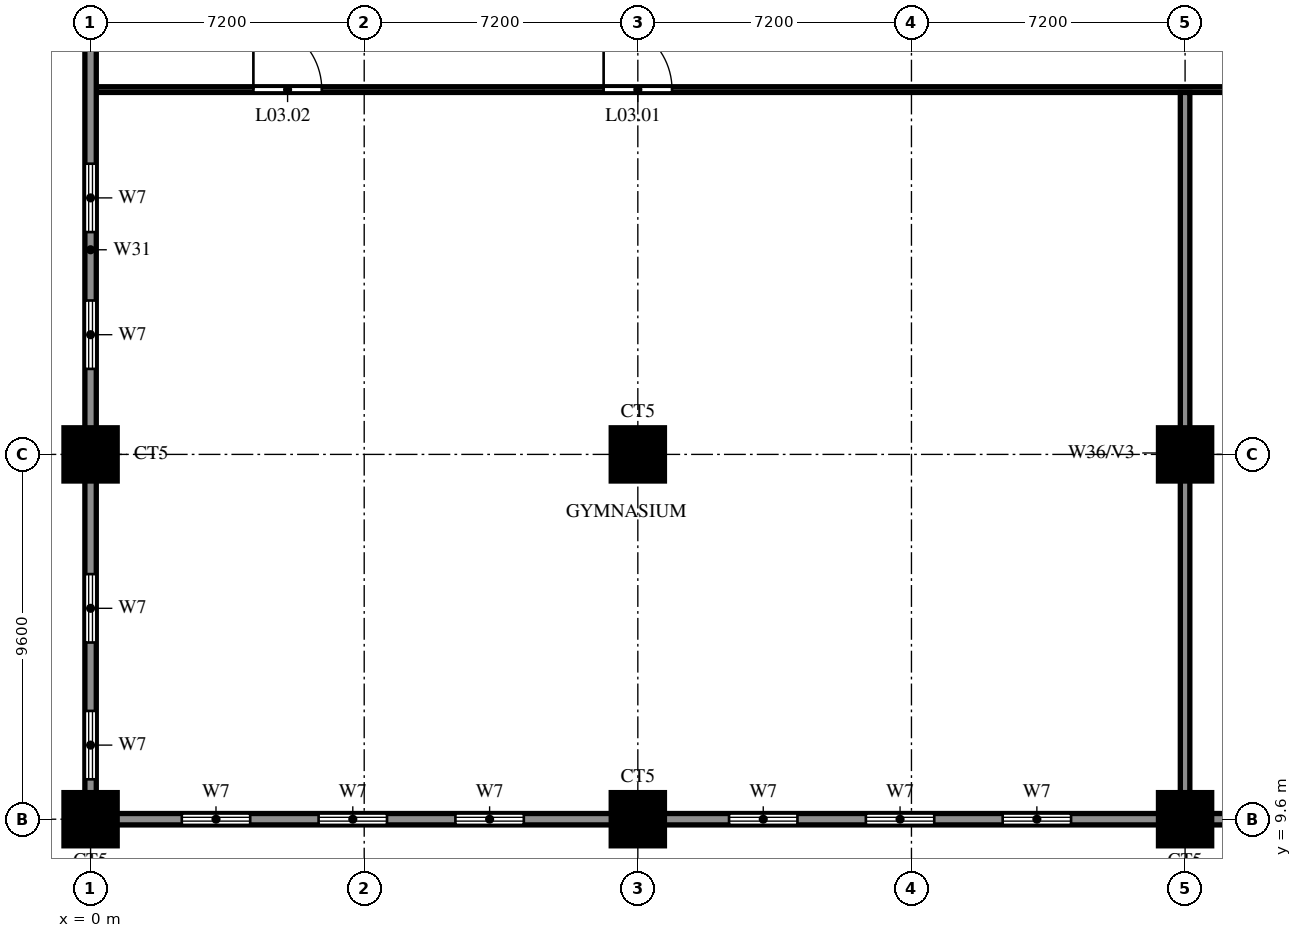
"""IFC4 building model, lengths in metres.
Left out: names, types, materials, properties, quantities, classifications, styles, units other than length and angle.
Written with IfcOpenShell. Run it as: python <this file> out.ifc"""

import sys

from ifc_helpers import new_model, si_unit, direction, frame, frame_2d, origin, origin_2d, place, context, subcontext, project, spatial, rectangle, circle, extrude, source, transform, mapped, element, fill, save


model = new_model("IFC4")
c1 = context("Model", 3, precision=1e-05, world=origin(), true_north=direction((0.0, 1.0)))
c2 = subcontext(c1, "Body", "Model", "MODEL_VIEW")
j1 = project(units=[si_unit("LENGTHUNIT", "METRE"), si_unit("PLANEANGLEUNIT", "RADIAN")], contexts=[c1])
p1 = place(None, origin())
s1 = spatial("IfcSite", under=j1, at=p1, CompositionType="ELEMENT")
p2 = place(p1, origin())
s2 = spatial("IfcBuilding", under=s1, at=p2, CompositionType="ELEMENT")
p3 = place(p2, frame((0.0, 0.0, 17.4)))
s3 = spatial("IfcBuildingStorey", under=s2, at=p3, CompositionType="ELEMENT", Elevation=17.4)
m1 = source(origin(), c2, "Body", "SweptSolid", [
    extrude(circle(Radius=0.7, at=origin_2d()), origin(), (0.0, 0.0, 1.0), 3.8),
])
for number, where, z_axis, x_axis in (
    (1, (0.0, 9.6, 0.0), (0.0, 0.0, 1.0), (1.0, 0.0, 0.0)),
    (2, (14.4, 9.6, 0.0), (0.0, 0.0, 1.0), (1.0, 0.0, 0.0)),
    (3, (28.8, 9.6, 0.0), (0.0, 0.0, 1.0), (1.0, 0.0, 0.0)),
    (4, (0.0, 19.2, 0.0), (0.0, 0.0, 1.0), (1.0, 0.0, 0.0)),
    (5, (14.4, 19.2, 0.0), (0.0, 0.0, 1.0), (1.0, 0.0, 0.0)),
    (6, (28.8, 19.2, 0.0), (0.0, 0.0, 1.0), (1.0, 0.0, 0.0)),
):
    element("IfcColumn", number, at=place(p3, frame(where, z_axis=z_axis, x_axis=x_axis)), inside=s3, PredefinedType="COLUMN", context=c2, shape_type="MappedRepresentation", body=[
        mapped(m1, transform((0.0, 0.0, 0.0))),
    ])
p4 = place(p3, frame((0.0, 9.6, 0.0), z_axis=(0.0, 0.0, 1.0), x_axis=(1.0, 0.0, 0.0)))
e7 = element("IfcWall", 7, at=p4, inside=s3, PredefinedType="SOLIDWALL", context=c2, shape_type="SweptSolid", body=[
    extrude(rectangle(XDim=100.8, YDim=0.3, at=frame_2d((50.4, 0.0))), origin(), (0.0, 0.0, 1.0), 3.8),
])
p5 = place(p4, frame((2.4, 0.0, 0.6)))
e8 = element("IfcOpeningElement", 8, at=p5, cuts=e7, PredefinedType="OPENING", context=c2, shape_type="SweptSolid", body=[
    extrude(rectangle(XDim=1.8, YDim=2.4, at=frame_2d((0.9, 1.2))), frame((0.0, 0.16, 0.0), z_axis=(0.0, -1.0, 0.0), x_axis=(1.0, 0.0, 0.0)), (0.0, 0.0, 1.0), 0.32),
])
p6 = place(p4, frame((6.0, 0.0, 0.6)))
e9 = element("IfcOpeningElement", 9, at=p6, cuts=e7, PredefinedType="OPENING", context=c2, shape_type="SweptSolid", body=[
    extrude(rectangle(XDim=1.8, YDim=2.4, at=frame_2d((0.9, 1.2))), frame((0.0, 0.16, 0.0), z_axis=(0.0, -1.0, 0.0), x_axis=(1.0, 0.0, 0.0)), (0.0, 0.0, 1.0), 0.32),
])
p7 = place(p4, frame((9.6, 0.0, 0.6)))
e10 = element("IfcOpeningElement", 10, at=p7, cuts=e7, PredefinedType="OPENING", context=c2, shape_type="SweptSolid", body=[
    extrude(rectangle(XDim=1.8, YDim=2.4, at=frame_2d((0.9, 1.2))), frame((0.0, 0.16, 0.0), z_axis=(0.0, -1.0, 0.0), x_axis=(1.0, 0.0, 0.0)), (0.0, 0.0, 1.0), 0.32),
])
p8 = place(p4, frame((16.8, 0.0, 0.6)))
e11 = element("IfcOpeningElement", 11, at=p8, cuts=e7, PredefinedType="OPENING", context=c2, shape_type="SweptSolid", body=[
    extrude(rectangle(XDim=1.8, YDim=2.4, at=frame_2d((0.9, 1.2))), frame((0.0, 0.16, 0.0), z_axis=(0.0, -1.0, 0.0), x_axis=(1.0, 0.0, 0.0)), (0.0, 0.0, 1.0), 0.32),
])
p9 = place(p4, frame((20.4, 0.0, 0.6)))
e12 = element("IfcOpeningElement", 12, at=p9, cuts=e7, PredefinedType="OPENING", context=c2, shape_type="SweptSolid", body=[
    extrude(rectangle(XDim=1.8, YDim=2.4, at=frame_2d((0.9, 1.2))), frame((0.0, 0.16, 0.0), z_axis=(0.0, -1.0, 0.0), x_axis=(1.0, 0.0, 0.0)), (0.0, 0.0, 1.0), 0.32),
])
p10 = place(p4, frame((24.0, 0.0, 0.6)))
e13 = element("IfcOpeningElement", 13, at=p10, cuts=e7, PredefinedType="OPENING", context=c2, shape_type="SweptSolid", body=[
    extrude(rectangle(XDim=1.8, YDim=2.4, at=frame_2d((0.9, 1.2))), frame((0.0, 0.16, 0.0), z_axis=(0.0, -1.0, 0.0), x_axis=(1.0, 0.0, 0.0)), (0.0, 0.0, 1.0), 0.32),
])
p11 = place(p4, frame((31.2, 0.0, 0.6)))
e14 = element("IfcOpeningElement", 14, at=p11, cuts=e7, PredefinedType="OPENING", context=c2, shape_type="SweptSolid", body=[
    extrude(rectangle(XDim=1.8, YDim=2.4, at=frame_2d((0.9, 1.2))), frame((0.0, 0.16, 0.0), z_axis=(0.0, -1.0, 0.0), x_axis=(1.0, 0.0, 0.0)), (0.0, 0.0, 1.0), 0.32),
])
p12 = place(p4, frame((34.8, 0.0, 0.6)))
e15 = element("IfcOpeningElement", 15, at=p12, cuts=e7, PredefinedType="OPENING", context=c2, shape_type="SweptSolid", body=[
    extrude(rectangle(XDim=1.8, YDim=2.4, at=frame_2d((0.9, 1.2))), frame((0.0, 0.16, 0.0), z_axis=(0.0, -1.0, 0.0), x_axis=(1.0, 0.0, 0.0)), (0.0, 0.0, 1.0), 0.32),
])
p13 = place(p4, frame((38.4, 0.0, 0.6)))
e16 = element("IfcOpeningElement", 16, at=p13, cuts=e7, PredefinedType="OPENING", context=c2, shape_type="SweptSolid", body=[
    extrude(rectangle(XDim=1.8, YDim=2.4, at=frame_2d((0.9, 1.2))), frame((0.0, 0.16, 0.0), z_axis=(0.0, -1.0, 0.0), x_axis=(1.0, 0.0, 0.0)), (0.0, 0.0, 1.0), 0.32),
])
p14 = place(p4, frame((45.6, 0.0, 0.6)))
e17 = element("IfcOpeningElement", 17, at=p14, cuts=e7, PredefinedType="OPENING", context=c2, shape_type="SweptSolid", body=[
    extrude(rectangle(XDim=1.8, YDim=2.4, at=frame_2d((0.9, 1.2))), frame((0.0, 0.16, 0.0), z_axis=(0.0, -1.0, 0.0), x_axis=(1.0, 0.0, 0.0)), (0.0, 0.0, 1.0), 0.32),
])
p15 = place(p4, frame((49.2, 0.0, 0.6)))
e18 = element("IfcOpeningElement", 18, at=p15, cuts=e7, PredefinedType="OPENING", context=c2, shape_type="SweptSolid", body=[
    extrude(rectangle(XDim=1.8, YDim=2.4, at=frame_2d((0.9, 1.2))), frame((0.0, 0.16, 0.0), z_axis=(0.0, -1.0, 0.0), x_axis=(1.0, 0.0, 0.0)), (0.0, 0.0, 1.0), 0.32),
])
p16 = place(p4, frame((52.8, 0.0, 0.6)))
e19 = element("IfcOpeningElement", 19, at=p16, cuts=e7, PredefinedType="OPENING", context=c2, shape_type="SweptSolid", body=[
    extrude(rectangle(XDim=1.8, YDim=2.4, at=frame_2d((0.9, 1.2))), frame((0.0, 0.16, 0.0), z_axis=(0.0, -1.0, 0.0), x_axis=(1.0, 0.0, 0.0)), (0.0, 0.0, 1.0), 0.32),
])
p17 = place(p4, frame((60.0, 0.0, 0.6)))
e20 = element("IfcOpeningElement", 20, at=p17, cuts=e7, PredefinedType="OPENING", context=c2, shape_type="SweptSolid", body=[
    extrude(rectangle(XDim=1.8, YDim=2.4, at=frame_2d((0.9, 1.2))), frame((0.0, 0.16, 0.0), z_axis=(0.0, -1.0, 0.0), x_axis=(1.0, 0.0, 0.0)), (0.0, 0.0, 1.0), 0.32),
])
p18 = place(p4, frame((63.6, 0.0, 0.6)))
e21 = element("IfcOpeningElement", 21, at=p18, cuts=e7, PredefinedType="OPENING", context=c2, shape_type="SweptSolid", body=[
    extrude(rectangle(XDim=1.8, YDim=2.4, at=frame_2d((0.9, 1.2))), frame((0.0, 0.16, 0.0), z_axis=(0.0, -1.0, 0.0), x_axis=(1.0, 0.0, 0.0)), (0.0, 0.0, 1.0), 0.32),
])
p19 = place(p4, frame((67.2, 0.0, 0.6)))
e22 = element("IfcOpeningElement", 22, at=p19, cuts=e7, PredefinedType="OPENING", context=c2, shape_type="SweptSolid", body=[
    extrude(rectangle(XDim=1.8, YDim=2.4, at=frame_2d((0.9, 1.2))), frame((0.0, 0.16, 0.0), z_axis=(0.0, -1.0, 0.0), x_axis=(1.0, 0.0, 0.0)), (0.0, 0.0, 1.0), 0.32),
])
p20 = place(p4, frame((74.4, 0.0, 0.6)))
e23 = element("IfcOpeningElement", 23, at=p20, cuts=e7, PredefinedType="OPENING", context=c2, shape_type="SweptSolid", body=[
    extrude(rectangle(XDim=1.8, YDim=2.4, at=frame_2d((0.9, 1.2))), frame((0.0, 0.16, 0.0), z_axis=(0.0, -1.0, 0.0), x_axis=(1.0, 0.0, 0.0)), (0.0, 0.0, 1.0), 0.32),
])
p21 = place(p4, frame((78.0, 0.0, 0.6)))
e24 = element("IfcOpeningElement", 24, at=p21, cuts=e7, PredefinedType="OPENING", context=c2, shape_type="SweptSolid", body=[
    extrude(rectangle(XDim=1.8, YDim=2.4, at=frame_2d((0.9, 1.2))), frame((0.0, 0.16, 0.0), z_axis=(0.0, -1.0, 0.0), x_axis=(1.0, 0.0, 0.0)), (0.0, 0.0, 1.0), 0.32),
])
p22 = place(p4, frame((81.6, 0.0, 0.6)))
e25 = element("IfcOpeningElement", 25, at=p22, cuts=e7, PredefinedType="OPENING", context=c2, shape_type="SweptSolid", body=[
    extrude(rectangle(XDim=1.8, YDim=2.4, at=frame_2d((0.9, 1.2))), frame((0.0, 0.16, 0.0), z_axis=(0.0, -1.0, 0.0), x_axis=(1.0, 0.0, 0.0)), (0.0, 0.0, 1.0), 0.32),
])
p23 = place(p4, frame((88.8, 0.0, 0.6)))
e26 = element("IfcOpeningElement", 26, at=p23, cuts=e7, PredefinedType="OPENING", context=c2, shape_type="SweptSolid", body=[
    extrude(rectangle(XDim=1.8, YDim=2.4, at=frame_2d((0.9, 1.2))), frame((0.0, 0.16, 0.0), z_axis=(0.0, -1.0, 0.0), x_axis=(1.0, 0.0, 0.0)), (0.0, 0.0, 1.0), 0.32),
])
p24 = place(p4, frame((92.4, 0.0, 0.6)))
e27 = element("IfcOpeningElement", 27, at=p24, cuts=e7, PredefinedType="OPENING", context=c2, shape_type="SweptSolid", body=[
    extrude(rectangle(XDim=1.8, YDim=2.4, at=frame_2d((0.9, 1.2))), frame((0.0, 0.16, 0.0), z_axis=(0.0, -1.0, 0.0), x_axis=(1.0, 0.0, 0.0)), (0.0, 0.0, 1.0), 0.32),
])
p25 = place(p4, frame((96.0, 0.0, 0.6)))
e28 = element("IfcOpeningElement", 28, at=p25, cuts=e7, PredefinedType="OPENING", context=c2, shape_type="SweptSolid", body=[
    extrude(rectangle(XDim=1.8, YDim=2.4, at=frame_2d((0.9, 1.2))), frame((0.0, 0.16, 0.0), z_axis=(0.0, -1.0, 0.0), x_axis=(1.0, 0.0, 0.0)), (0.0, 0.0, 1.0), 0.32),
])
p26 = place(p3, frame((0.15, 28.8, 0.0), z_axis=(0.0, 0.0, 1.0), x_axis=(1.0, 0.0, 0.0)))
e29 = element("IfcWall", 29, at=p26, inside=s3, PredefinedType="PARTITIONING", context=c2, shape_type="SweptSolid", body=[
    extrude(rectangle(XDim=100.5, YDim=0.15, at=frame_2d((50.25, 0.0))), origin(), (0.0, 0.0, 1.0), 2.6),
])
p27 = place(p26, frame((13.35, 0.0, 0.0)))
e30 = element("IfcOpeningElement", 30, at=p27, cuts=e29, PredefinedType="OPENING", context=c2, shape_type="SweptSolid", body=[
    extrude(rectangle(XDim=1.8, YDim=2.1, at=frame_2d((0.9, 1.05))), frame((0.0, 0.085, 0.0), z_axis=(0.0, -1.0, 0.0), x_axis=(1.0, 0.0, 0.0)), (0.0, 0.0, 1.0), 0.17),
])
p28 = place(p26, frame((4.134, 0.0, 0.0)))
e31 = element("IfcOpeningElement", 31, at=p28, cuts=e29, PredefinedType="OPENING", context=c2, shape_type="SweptSolid", body=[
    extrude(rectangle(XDim=1.8, YDim=2.1, at=frame_2d((0.9, 1.05))), frame((0.0, 0.085, 0.0), z_axis=(0.0, -1.0, 0.0), x_axis=(1.0, 0.0, 0.0)), (0.0, 0.0, 1.0), 0.17),
])
p29 = place(p26, frame((49.35, 0.0, 0.0)))
e32 = element("IfcOpeningElement", 32, at=p29, cuts=e29, PredefinedType="OPENING", context=c2, shape_type="SweptSolid", body=[
    extrude(rectangle(XDim=1.8, YDim=2.1, at=frame_2d((0.9, 1.05))), frame((0.0, 0.085, 0.0), z_axis=(0.0, -1.0, 0.0), x_axis=(1.0, 0.0, 0.0)), (0.0, 0.0, 1.0), 0.17),
])
p30 = place(p26, frame((35.526, 0.0, 0.0)))
e33 = element("IfcOpeningElement", 33, at=p30, cuts=e29, PredefinedType="OPENING", context=c2, shape_type="SweptSolid", body=[
    extrude(rectangle(XDim=1.8, YDim=2.1, at=frame_2d((0.9, 1.05))), frame((0.0, 0.085, 0.0), z_axis=(0.0, -1.0, 0.0), x_axis=(1.0, 0.0, 0.0)), (0.0, 0.0, 1.0), 0.17),
])
p31 = place(p26, frame((85.35, 0.0, 0.0)))
e34 = element("IfcOpeningElement", 34, at=p31, cuts=e29, PredefinedType="OPENING", context=c2, shape_type="SweptSolid", body=[
    extrude(rectangle(XDim=1.8, YDim=2.1, at=frame_2d((0.9, 1.05))), frame((0.0, 0.085, 0.0), z_axis=(0.0, -1.0, 0.0), x_axis=(1.0, 0.0, 0.0)), (0.0, 0.0, 1.0), 0.17),
])
p32 = place(p26, frame((76.134, 0.0, 0.0)))
e35 = element("IfcOpeningElement", 35, at=p32, cuts=e29, PredefinedType="OPENING", context=c2, shape_type="SweptSolid", body=[
    extrude(rectangle(XDim=1.8, YDim=2.1, at=frame_2d((0.9, 1.05))), frame((0.0, 0.085, 0.0), z_axis=(0.0, -1.0, 0.0), x_axis=(1.0, 0.0, 0.0)), (0.0, 0.0, 1.0), 0.17),
])
p33 = place(p3, frame((0.0, 9.6, 0.0), z_axis=(0.0, 0.0, 1.0), x_axis=(0.0, 1.0, 0.0)))
e36 = element("IfcWall", 36, at=p33, inside=s3, PredefinedType="SOLIDWALL", context=c2, shape_type="SweptSolid", body=[
    extrude(rectangle(XDim=33.3, YDim=0.3, at=frame_2d((16.65, 0.0))), origin(), (0.0, 0.0, 1.0), 3.8),
])
p34 = place(p33, frame((1.05, 0.0, 0.6)))
e37 = element("IfcOpeningElement", 37, at=p34, cuts=e36, PredefinedType="OPENING", context=c2, shape_type="SweptSolid", body=[
    extrude(rectangle(XDim=1.8, YDim=2.4, at=frame_2d((0.9, 1.2))), frame((0.0, 0.16, 0.0), z_axis=(0.0, -1.0, 0.0), x_axis=(1.0, 0.0, 0.0)), (0.0, 0.0, 1.0), 0.32),
])
p35 = place(p33, frame((4.65, 0.0, 0.6)))
e38 = element("IfcOpeningElement", 38, at=p35, cuts=e36, PredefinedType="OPENING", context=c2, shape_type="SweptSolid", body=[
    extrude(rectangle(XDim=1.8, YDim=2.4, at=frame_2d((0.9, 1.2))), frame((0.0, 0.16, 0.0), z_axis=(0.0, -1.0, 0.0), x_axis=(1.0, 0.0, 0.0)), (0.0, 0.0, 1.0), 0.32),
])
p36 = place(p33, frame((11.85, 0.0, 0.6)))
e39 = element("IfcOpeningElement", 39, at=p36, cuts=e36, PredefinedType="OPENING", context=c2, shape_type="SweptSolid", body=[
    extrude(rectangle(XDim=1.8, YDim=2.4, at=frame_2d((0.9, 1.2))), frame((0.0, 0.16, 0.0), z_axis=(0.0, -1.0, 0.0), x_axis=(1.0, 0.0, 0.0)), (0.0, 0.0, 1.0), 0.32),
])
p37 = place(p33, frame((15.45, 0.0, 0.6)))
e40 = element("IfcOpeningElement", 40, at=p37, cuts=e36, PredefinedType="OPENING", context=c2, shape_type="SweptSolid", body=[
    extrude(rectangle(XDim=1.8, YDim=2.4, at=frame_2d((0.9, 1.2))), frame((0.0, 0.16, 0.0), z_axis=(0.0, -1.0, 0.0), x_axis=(1.0, 0.0, 0.0)), (0.0, 0.0, 1.0), 0.32),
])
p38 = place(p33, frame((26.25, 0.0, 0.6)))
e41 = element("IfcOpeningElement", 41, at=p38, cuts=e36, PredefinedType="OPENING", context=c2, shape_type="SweptSolid", body=[
    extrude(rectangle(XDim=1.8, YDim=2.4, at=frame_2d((0.9, 1.2))), frame((0.0, 0.16, 0.0), z_axis=(0.0, -1.0, 0.0), x_axis=(1.0, 0.0, 0.0)), (0.0, 0.0, 1.0), 0.32),
])
p39 = place(p33, frame((29.85, 0.0, 0.6)))
e42 = element("IfcOpeningElement", 42, at=p39, cuts=e36, PredefinedType="OPENING", context=c2, shape_type="SweptSolid", body=[
    extrude(rectangle(XDim=1.8, YDim=2.4, at=frame_2d((0.9, 1.2))), frame((0.0, 0.16, 0.0), z_axis=(0.0, -1.0, 0.0), x_axis=(1.0, 0.0, 0.0)), (0.0, 0.0, 1.0), 0.32),
])
p40 = place(p3, frame((28.8, 9.75, 0.0), z_axis=(0.0, 0.0, 1.0), x_axis=(0.0, 1.0, 0.0)))
e43 = element("IfcWall", 43, at=p40, inside=s3, PredefinedType="SOLIDWALL", context=c2, shape_type="SweptSolid", body=[
    extrude(rectangle(XDim=18.975, YDim=0.25, at=frame_2d((9.488, 0.0))), origin(), (0.0, 0.0, 1.0), 2.6),
])
p41 = place(p27, origin())
e44 = element("IfcDoor", 44, at=p41, inside=s3, OperationType="DOUBLE_DOOR_SINGLE_SWING", PredefinedType="DOOR", context=c2, shape_type="SweptSolid", body=[
    extrude(rectangle(XDim=1.8, YDim=2.1, at=frame_2d((0.9, 1.05))), frame((0.0, 0.025, 0.0), z_axis=(0.0, -1.0, 0.0), x_axis=(1.0, 0.0, 0.0)), (0.0, 0.0, 1.0), 0.05),
])
fill(e30, e44)
p42 = place(p28, origin())
e45 = element("IfcDoor", 45, at=p42, inside=s3, OperationType="DOUBLE_DOOR_SINGLE_SWING", PredefinedType="DOOR", context=c2, shape_type="SweptSolid", body=[
    extrude(rectangle(XDim=1.8, YDim=2.1, at=frame_2d((0.9, 1.05))), frame((0.0, 0.025, 0.0), z_axis=(0.0, -1.0, 0.0), x_axis=(1.0, 0.0, 0.0)), (0.0, 0.0, 1.0), 0.05),
])
fill(e31, e45)
p43 = place(p5, origin())
e46 = element("IfcWindow", 46, at=p43, inside=s3, PartitioningType="DOUBLE_PANEL_VERTICAL", PredefinedType="WINDOW", context=c2, shape_type="SweptSolid", body=[
    extrude(rectangle(XDim=1.8, YDim=2.4, at=frame_2d((0.9, 1.2))), frame((0.0, 0.03, 0.0), z_axis=(0.0, -1.0, 0.0), x_axis=(1.0, 0.0, 0.0)), (0.0, 0.0, 1.0), 0.06),
])
fill(e8, e46)
p44 = place(p6, origin())
e47 = element("IfcWindow", 47, at=p44, inside=s3, PartitioningType="DOUBLE_PANEL_VERTICAL", PredefinedType="WINDOW", context=c2, shape_type="SweptSolid", body=[
    extrude(rectangle(XDim=1.8, YDim=2.4, at=frame_2d((0.9, 1.2))), frame((0.0, 0.03, 0.0), z_axis=(0.0, -1.0, 0.0), x_axis=(1.0, 0.0, 0.0)), (0.0, 0.0, 1.0), 0.06),
])
fill(e9, e47)
p45 = place(p7, origin())
e48 = element("IfcWindow", 48, at=p45, inside=s3, PartitioningType="DOUBLE_PANEL_VERTICAL", PredefinedType="WINDOW", context=c2, shape_type="SweptSolid", body=[
    extrude(rectangle(XDim=1.8, YDim=2.4, at=frame_2d((0.9, 1.2))), frame((0.0, 0.03, 0.0), z_axis=(0.0, -1.0, 0.0), x_axis=(1.0, 0.0, 0.0)), (0.0, 0.0, 1.0), 0.06),
])
fill(e10, e48)
p46 = place(p8, origin())
e49 = element("IfcWindow", 49, at=p46, inside=s3, PartitioningType="DOUBLE_PANEL_VERTICAL", PredefinedType="WINDOW", context=c2, shape_type="SweptSolid", body=[
    extrude(rectangle(XDim=1.8, YDim=2.4, at=frame_2d((0.9, 1.2))), frame((0.0, 0.03, 0.0), z_axis=(0.0, -1.0, 0.0), x_axis=(1.0, 0.0, 0.0)), (0.0, 0.0, 1.0), 0.06),
])
fill(e11, e49)
p47 = place(p9, origin())
e50 = element("IfcWindow", 50, at=p47, inside=s3, PartitioningType="DOUBLE_PANEL_VERTICAL", PredefinedType="WINDOW", context=c2, shape_type="SweptSolid", body=[
    extrude(rectangle(XDim=1.8, YDim=2.4, at=frame_2d((0.9, 1.2))), frame((0.0, 0.03, 0.0), z_axis=(0.0, -1.0, 0.0), x_axis=(1.0, 0.0, 0.0)), (0.0, 0.0, 1.0), 0.06),
])
fill(e12, e50)
p48 = place(p10, origin())
e51 = element("IfcWindow", 51, at=p48, inside=s3, PartitioningType="DOUBLE_PANEL_VERTICAL", PredefinedType="WINDOW", context=c2, shape_type="SweptSolid", body=[
    extrude(rectangle(XDim=1.8, YDim=2.4, at=frame_2d((0.9, 1.2))), frame((0.0, 0.03, 0.0), z_axis=(0.0, -1.0, 0.0), x_axis=(1.0, 0.0, 0.0)), (0.0, 0.0, 1.0), 0.06),
])
fill(e13, e51)
p49 = place(p34, origin())
e52 = element("IfcWindow", 52, at=p49, inside=s3, PartitioningType="DOUBLE_PANEL_VERTICAL", PredefinedType="WINDOW", context=c2, shape_type="SweptSolid", body=[
    extrude(rectangle(XDim=1.8, YDim=2.4, at=frame_2d((0.9, 1.2))), frame((0.0, 0.03, 0.0), z_axis=(0.0, -1.0, 0.0), x_axis=(1.0, 0.0, 0.0)), (0.0, 0.0, 1.0), 0.06),
])
fill(e37, e52)
p50 = place(p35, origin())
e53 = element("IfcWindow", 53, at=p50, inside=s3, PartitioningType="DOUBLE_PANEL_VERTICAL", PredefinedType="WINDOW", context=c2, shape_type="SweptSolid", body=[
    extrude(rectangle(XDim=1.8, YDim=2.4, at=frame_2d((0.9, 1.2))), frame((0.0, 0.03, 0.0), z_axis=(0.0, -1.0, 0.0), x_axis=(1.0, 0.0, 0.0)), (0.0, 0.0, 1.0), 0.06),
])
fill(e38, e53)
p51 = place(p36, origin())
e54 = element("IfcWindow", 54, at=p51, inside=s3, PartitioningType="DOUBLE_PANEL_VERTICAL", PredefinedType="WINDOW", context=c2, shape_type="SweptSolid", body=[
    extrude(rectangle(XDim=1.8, YDim=2.4, at=frame_2d((0.9, 1.2))), frame((0.0, 0.03, 0.0), z_axis=(0.0, -1.0, 0.0), x_axis=(1.0, 0.0, 0.0)), (0.0, 0.0, 1.0), 0.06),
])
fill(e39, e54)
p52 = place(p37, origin())
e55 = element("IfcWindow", 55, at=p52, inside=s3, PartitioningType="DOUBLE_PANEL_VERTICAL", PredefinedType="WINDOW", context=c2, shape_type="SweptSolid", body=[
    extrude(rectangle(XDim=1.8, YDim=2.4, at=frame_2d((0.9, 1.2))), frame((0.0, 0.03, 0.0), z_axis=(0.0, -1.0, 0.0), x_axis=(1.0, 0.0, 0.0)), (0.0, 0.0, 1.0), 0.06),
])
fill(e40, e55)
save(model, sys.argv[1])
